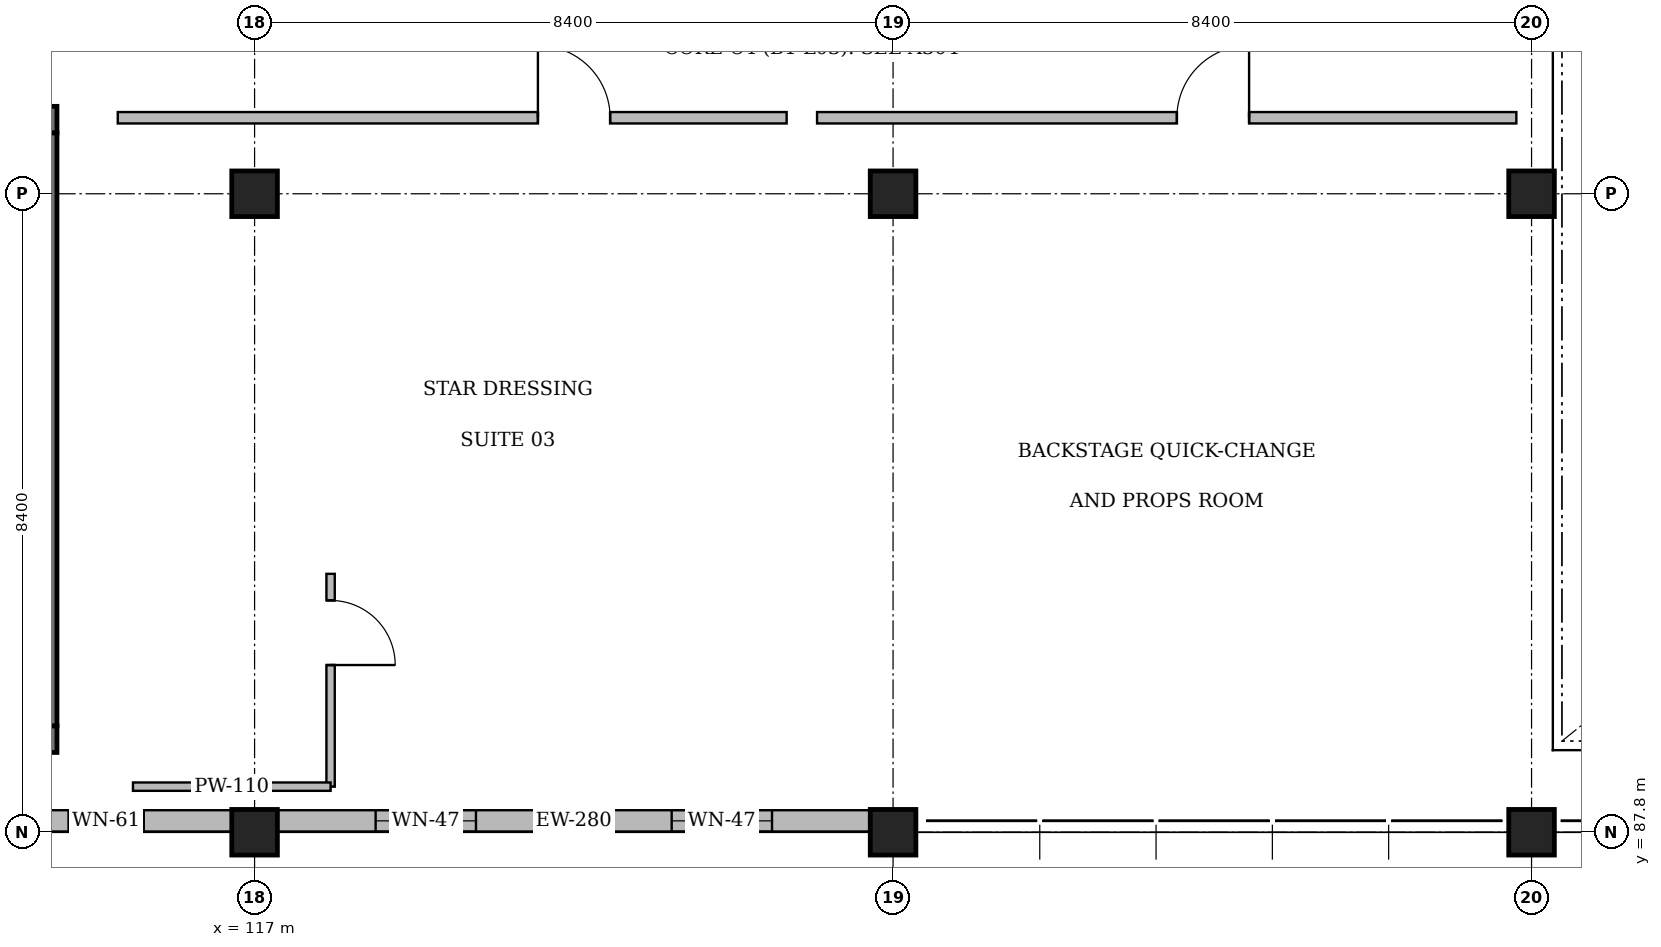
"""IFC4 building model, lengths in metres.
Left out: names, types, materials, properties, quantities, classifications, styles, units other than length and angle.
Written with IfcOpenShell. Run it as: python <this file> out.ifc"""

import sys

from ifc_helpers import new_model, si_unit, direction, frame, frame_2d, origin, origin_2d, place, context, subcontext, project, spatial, rectangle, extrude, element, fill, save


model = new_model("IFC4")
c1 = context("Model", 3, precision=1e-05, world=origin(), true_north=direction((0.0, 1.0)))
c2 = subcontext(c1, "Body", "Model", "MODEL_VIEW")
j1 = project(units=[si_unit("LENGTHUNIT", "METRE"), si_unit("PLANEANGLEUNIT", "RADIAN")], contexts=[c1])
p1 = place(None, origin())
s1 = spatial("IfcSite", under=j1, at=p1, CompositionType="ELEMENT")
p2 = place(p1, origin())
s2 = spatial("IfcBuilding", under=s1, at=p2, CompositionType="ELEMENT")
p3 = place(p2, frame((0.0, 0.0, 4.8)))
s3 = spatial("IfcBuildingStorey", under=s2, at=p3, CompositionType="ELEMENT", Elevation=4.8)
for number, where, z_axis, x_axis in (
    (1, (117.0, 87.8, 0.0), (0.0, 0.0, 1.0), (1.0, 0.0, 0.0)),
    (2, (117.0, 96.2, 0.0), (0.0, 0.0, 1.0), (1.0, 0.0, 0.0)),
    (3, (125.4, 87.8, 0.0), (0.0, 0.0, 1.0), (1.0, 0.0, 0.0)),
    (4, (125.4, 96.2, 0.0), (0.0, 0.0, 1.0), (1.0, 0.0, 0.0)),
    (5, (133.8, 87.8, 0.0), (0.0, 0.0, 1.0), (1.0, 0.0, 0.0)),
    (6, (133.8, 96.2, 0.0), (0.0, 0.0, 1.0), (1.0, 0.0, 0.0)),
):
    element("IfcColumn", number, at=place(p3, frame(where, z_axis=z_axis, x_axis=x_axis)), inside=s3, PredefinedType="COLUMN", context=c2, shape_type="SweptSolid", body=[
        extrude(rectangle(XDim=0.6, YDim=0.6, at=origin_2d()), origin(), (0.0, 0.0, 1.0), 4.2),
    ])
p4 = place(p3, frame((114.4, 89.025, 0.0), z_axis=(0.0, 0.0, 1.0), x_axis=(-1.0, 0.0, 0.0)))
e7 = element("IfcWall", 7, at=p4, inside=s3, PredefinedType="SOLIDWALL", context=c2, shape_type="SweptSolid", body=[
    extrude(rectangle(XDim=4.15, YDim=0.35, at=frame_2d((2.075, 0.0))), origin(), (0.0, 0.0, 1.0), 4.2),
])
p5 = place(p3, frame((110.25, 97.175, 0.0), z_axis=(0.0, 0.0, 1.0), x_axis=(1.0, 0.0, 0.0)))
e8 = element("IfcWall", 8, at=p5, inside=s3, PredefinedType="SOLIDWALL", context=c2, shape_type="SweptSolid", body=[
    extrude(rectangle(XDim=4.15, YDim=0.35, at=frame_2d((2.075, 0.0))), origin(), (0.0, 0.0, 1.0), 4.2),
])
p6 = place(p5, frame((1.525, 0.0, 0.0)))
e9 = element("IfcOpeningElement", 9, at=p6, cuts=e8, PredefinedType="OPENING", context=c2, shape_type="SweptSolid", body=[
    extrude(rectangle(XDim=1.1, YDim=2.15, at=frame_2d((0.55, 1.075))), frame((0.0, 0.195, 0.0), z_axis=(0.0, -1.0, 0.0), x_axis=(1.0, 0.0, 0.0)), (0.0, 0.0, 1.0), 0.39),
])
p7 = place(p3, frame((114.225, 97.0, 0.0), z_axis=(0.0, 0.0, 1.0), x_axis=(0.0, -1.0, 0.0)))
e10 = element("IfcWall", 10, at=p7, inside=s3, PredefinedType="SOLIDWALL", context=c2, shape_type="SweptSolid", body=[
    extrude(rectangle(XDim=7.8, YDim=0.35, at=frame_2d((3.9, 0.0))), origin(), (0.0, 0.0, 1.0), 4.2),
])
p8 = place(p3, frame((110.105, 87.95, 0.0), z_axis=(0.0, 0.0, 1.0), x_axis=(1.0, 0.0, 0.0)))
e11 = element("IfcWall", 11, at=p8, inside=s3, PredefinedType="SOLIDWALL", context=c2, shape_type="SweptSolid", body=[
    extrude(rectangle(XDim=6.59, YDim=0.28, at=frame_2d((3.295, 0.0))), origin(), (0.0, 0.0, 1.0), 3.273),
])
p9 = place(p8, frame((1.153, 0.0, 0.95)))
e12 = element("IfcOpeningElement", 12, at=p9, cuts=e11, PredefinedType="OPENING", context=c2, shape_type="SweptSolid", body=[
    extrude(rectangle(XDim=0.99, YDim=1.8, at=frame_2d((0.495, 0.9))), frame((0.0, 0.16, 0.0), z_axis=(0.0, -1.0, 0.0), x_axis=(1.0, 0.0, 0.0)), (0.0, 0.0, 1.0), 0.32),
])
p10 = place(p8, frame((4.448, 0.0, 0.95)))
e13 = element("IfcOpeningElement", 13, at=p10, cuts=e11, PredefinedType="OPENING", context=c2, shape_type="SweptSolid", body=[
    extrude(rectangle(XDim=0.99, YDim=1.8, at=frame_2d((0.495, 0.9))), frame((0.0, 0.16, 0.0), z_axis=(0.0, -1.0, 0.0), x_axis=(1.0, 0.0, 0.0)), (0.0, 0.0, 1.0), 0.32),
])
p11 = place(p3, frame((117.305, 87.95, 0.0), z_axis=(0.0, 0.0, 1.0), x_axis=(1.0, 0.0, 0.0)))
e14 = element("IfcWall", 14, at=p11, inside=s3, PredefinedType="SOLIDWALL", context=c2, shape_type="SweptSolid", body=[
    extrude(rectangle(XDim=7.79, YDim=0.28, at=frame_2d((3.895, 0.0))), origin(), (0.0, 0.0, 1.0), 3.273),
])
p12 = place(p11, frame((1.288, 0.0, 0.95)))
e15 = element("IfcOpeningElement", 15, at=p12, cuts=e14, PredefinedType="OPENING", context=c2, shape_type="SweptSolid", body=[
    extrude(rectangle(XDim=1.32, YDim=1.65, at=frame_2d((0.66, 0.825))), frame((0.0, 0.16, 0.0), z_axis=(0.0, -1.0, 0.0), x_axis=(1.0, 0.0, 0.0)), (0.0, 0.0, 1.0), 0.32),
])
p13 = place(p11, frame((5.183, 0.0, 0.95)))
e16 = element("IfcOpeningElement", 16, at=p13, cuts=e14, PredefinedType="OPENING", context=c2, shape_type="SweptSolid", body=[
    extrude(rectangle(XDim=1.32, YDim=1.65, at=frame_2d((0.66, 0.825))), frame((0.0, 0.16, 0.0), z_axis=(0.0, -1.0, 0.0), x_axis=(1.0, 0.0, 0.0)), (0.0, 0.0, 1.0), 0.32),
])
p14 = place(p3, frame((118.0, 91.2, 0.0), z_axis=(0.0, 0.0, 1.0), x_axis=(0.0, -1.0, 0.0)))
e17 = element("IfcWall", 17, at=p14, inside=s3, PredefinedType="PARTITIONING", context=c2, shape_type="SweptSolid", body=[
    extrude(rectangle(XDim=2.8, YDim=0.11, at=frame_2d((1.4, 0.0))), origin(), (0.0, 0.0, 1.0), 3.94),
])
p15 = place(p14, frame((0.35, 0.0, 0.0)))
e18 = element("IfcOpeningElement", 18, at=p15, cuts=e17, PredefinedType="OPENING", context=c2, shape_type="SweptSolid", body=[
    extrude(rectangle(XDim=0.85, YDim=2.1, at=frame_2d((0.425, 1.05))), frame((0.0, 0.075, 0.0), z_axis=(0.0, -1.0, 0.0), x_axis=(1.0, 0.0, 0.0)), (0.0, 0.0, 1.0), 0.15),
])
p16 = place(p3, frame((118.0, 88.4, 0.0), z_axis=(0.0, 0.0, 1.0), x_axis=(-1.0, 0.0, 0.0)))
e19 = element("IfcWall", 19, at=p16, inside=s3, PredefinedType="PARTITIONING", context=c2, shape_type="SweptSolid", body=[
    extrude(rectangle(XDim=2.6, YDim=0.11, at=frame_2d((1.3, 0.0))), origin(), (0.0, 0.0, 1.0), 3.94),
])
p17 = place(p3, frame((115.2, 97.2, 0.0), z_axis=(0.0, 0.0, 1.0), x_axis=(1.0, 0.0, 0.0)))
e20 = element("IfcWall", 20, at=p17, inside=s3, PredefinedType="PARTITIONING", context=c2, shape_type="SweptSolid", body=[
    extrude(rectangle(XDim=8.8, YDim=0.15, at=frame_2d((4.4, 0.0))), origin(), (0.0, 0.0, 1.0), 3.94),
])
p18 = place(p17, frame((5.528, 0.0, 0.0)))
e21 = element("IfcOpeningElement", 21, at=p18, cuts=e20, PredefinedType="OPENING", context=c2, shape_type="SweptSolid", body=[
    extrude(rectangle(XDim=0.95, YDim=2.2, at=frame_2d((0.475, 1.1))), frame((0.0, 0.095, 0.0), z_axis=(0.0, -1.0, 0.0), x_axis=(1.0, 0.0, 0.0)), (0.0, 0.0, 1.0), 0.19),
])
p19 = place(p3, frame((124.4, 97.2, 0.0), z_axis=(0.0, 0.0, 1.0), x_axis=(1.0, 0.0, 0.0)))
e22 = element("IfcWall", 22, at=p19, inside=s3, PredefinedType="PARTITIONING", context=c2, shape_type="SweptSolid", body=[
    extrude(rectangle(XDim=9.2, YDim=0.15, at=frame_2d((4.6, 0.0))), origin(), (0.0, 0.0, 1.0), 3.94),
])
p20 = place(p19, frame((4.734, 0.0, 0.0)))
e23 = element("IfcOpeningElement", 23, at=p20, cuts=e22, PredefinedType="OPENING", context=c2, shape_type="SweptSolid", body=[
    extrude(rectangle(XDim=0.95, YDim=2.2, at=frame_2d((0.475, 1.1))), frame((0.0, 0.095, 0.0), z_axis=(0.0, -1.0, 0.0), x_axis=(1.0, 0.0, 0.0)), (0.0, 0.0, 1.0), 0.19),
])
p21 = place(p10, origin())
e24 = element("IfcWindow", 24, at=p21, inside=s3, PartitioningType="SINGLE_PANEL", PredefinedType="WINDOW", context=c2, shape_type="SweptSolid", body=[
    extrude(rectangle(XDim=0.99, YDim=1.8, at=frame_2d((0.495, 0.9))), frame((0.0, 0.03, 0.0), z_axis=(0.0, -1.0, 0.0), x_axis=(1.0, 0.0, 0.0)), (0.0, 0.0, 1.0), 0.06),
])
fill(e13, e24)
p22 = place(p12, origin())
e25 = element("IfcWindow", 25, at=p22, inside=s3, PartitioningType="SINGLE_PANEL", PredefinedType="WINDOW", context=c2, shape_type="SweptSolid", body=[
    extrude(rectangle(XDim=1.32, YDim=1.65, at=frame_2d((0.66, 0.825))), frame((0.0, 0.03, 0.0), z_axis=(0.0, -1.0, 0.0), x_axis=(1.0, 0.0, 0.0)), (0.0, 0.0, 1.0), 0.06),
])
fill(e15, e25)
p23 = place(p13, origin())
e26 = element("IfcWindow", 26, at=p23, inside=s3, PartitioningType="SINGLE_PANEL", PredefinedType="WINDOW", context=c2, shape_type="SweptSolid", body=[
    extrude(rectangle(XDim=1.32, YDim=1.65, at=frame_2d((0.66, 0.825))), frame((0.0, 0.03, 0.0), z_axis=(0.0, -1.0, 0.0), x_axis=(1.0, 0.0, 0.0)), (0.0, 0.0, 1.0), 0.06),
])
fill(e16, e26)
p24 = place(p15, origin())
e27 = element("IfcDoor", 27, at=p24, inside=s3, OperationType="SINGLE_SWING_RIGHT", PredefinedType="DOOR", context=c2, shape_type="SweptSolid", body=[
    extrude(rectangle(XDim=0.85, YDim=2.1, at=frame_2d((0.425, 1.05))), frame((0.0, 0.025, 0.0), z_axis=(0.0, -1.0, 0.0), x_axis=(1.0, 0.0, 0.0)), (0.0, 0.0, 1.0), 0.05),
])
fill(e18, e27)
p25 = place(p18, origin())
e28 = element("IfcDoor", 28, at=p25, inside=s3, OperationType="SINGLE_SWING_LEFT", PredefinedType="DOOR", context=c2, shape_type="SweptSolid", body=[
    extrude(rectangle(XDim=0.95, YDim=2.2, at=frame_2d((0.475, 1.1))), frame((0.0, 0.025, 0.0), z_axis=(0.0, -1.0, 0.0), x_axis=(1.0, 0.0, 0.0)), (0.0, 0.0, 1.0), 0.05),
])
fill(e21, e28)
p26 = place(p20, origin())
e29 = element("IfcDoor", 29, at=p26, inside=s3, OperationType="SINGLE_SWING_RIGHT", PredefinedType="DOOR", context=c2, shape_type="SweptSolid", body=[
    extrude(rectangle(XDim=0.95, YDim=2.2, at=frame_2d((0.475, 1.1))), frame((0.0, 0.025, 0.0), z_axis=(0.0, -1.0, 0.0), x_axis=(1.0, 0.0, 0.0)), (0.0, 0.0, 1.0), 0.05),
])
fill(e23, e29)
save(model, sys.argv[1])
